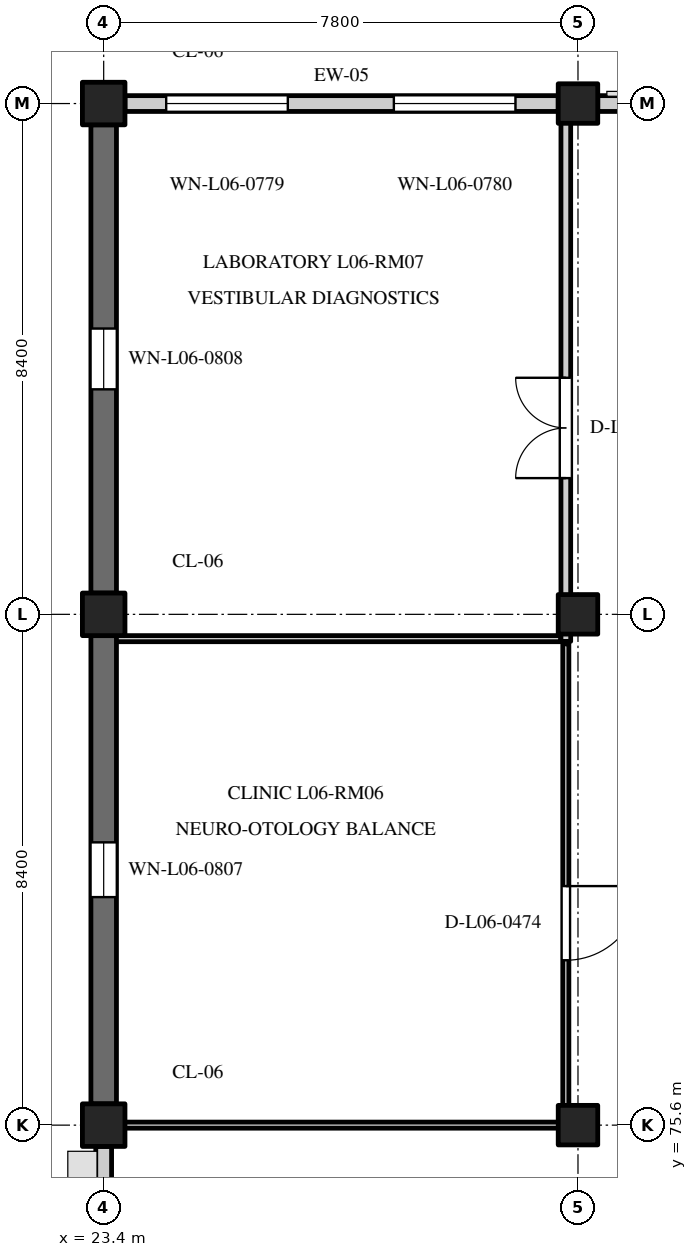
"""IFC4 building model, lengths in metres.
Left out: names, types, materials, properties, quantities, classifications, styles, units other than length and angle.
Written with IfcOpenShell. Run it as: python <this file> out.ifc"""

import sys

from ifc_helpers import new_model, si_unit, direction, frame, frame_2d, origin, origin_2d, place, context, subcontext, project, spatial, rectangle, extrude, element, fill, save


model = new_model("IFC4")
c1 = context("Model", 3, precision=1e-05, world=origin(), true_north=direction((0.0, 1.0)))
c2 = subcontext(c1, "Body", "Model", "MODEL_VIEW")
j1 = project(units=[si_unit("LENGTHUNIT", "METRE"), si_unit("PLANEANGLEUNIT", "RADIAN")], contexts=[c1])
p1 = place(None, origin())
s1 = spatial("IfcSite", under=j1, at=p1, CompositionType="ELEMENT")
p2 = place(p1, origin())
s2 = spatial("IfcBuilding", under=s1, at=p2, CompositionType="ELEMENT")
p3 = place(p2, frame((0.0, 0.0, 26.1)))
s3 = spatial("IfcBuildingStorey", under=s2, at=p3, CompositionType="ELEMENT", Elevation=26.1)
for number, where, z_axis, x_axis in (
    (1, (23.4, 75.6, 0.0), (0.0, 0.0, 1.0), (1.0, 0.0, 0.0)),
    (2, (23.4, 84.0, 0.0), (0.0, 0.0, 1.0), (1.0, 0.0, 0.0)),
    (3, (23.4, 92.4, 0.0), (0.0, 0.0, 1.0), (1.0, 0.0, 0.0)),
):
    element("IfcColumn", number, at=place(p3, frame(where, z_axis=z_axis, x_axis=x_axis)), inside=s3, PredefinedType="COLUMN", context=c2, shape_type="SweptSolid", body=[
        extrude(rectangle(XDim=0.7, YDim=0.7, at=origin_2d()), origin(), (0.0, 0.0, 1.0), 3.6),
    ])
for number, where, z_axis, x_axis in (
    (4, (31.2, 75.6, 0.0), (0.0, 0.0, 1.0), (1.0, 0.0, 0.0)),
    (5, (31.2, 84.0, 0.0), (0.0, 0.0, 1.0), (1.0, 0.0, 0.0)),
    (6, (31.2, 92.4, 0.0), (0.0, 0.0, 1.0), (1.0, 0.0, 0.0)),
):
    element("IfcColumn", number, at=place(p3, frame(where, z_axis=z_axis, x_axis=x_axis)), inside=s3, PredefinedType="COLUMN", context=c2, shape_type="SweptSolid", body=[
        extrude(rectangle(XDim=0.65, YDim=0.65, at=origin_2d()), origin(), (0.0, 0.0, 1.0), 3.6),
    ])
p4 = place(p3, frame((23.75, 92.4, 0.0), z_axis=(0.0, 0.0, 1.0), x_axis=(1.0, 0.0, 0.0)))
e7 = element("IfcWall", 7, at=p4, inside=s3, PredefinedType="STANDARD", context=c2, shape_type="SweptSolid", body=[
    extrude(rectangle(XDim=7.125, YDim=0.26, at=frame_2d((3.562, 0.0))), origin(), (0.0, 0.0, 1.0), 2.75),
])
p5 = place(p4, frame((0.678, 0.0, 0.8)))
e8 = element("IfcOpeningElement", 8, at=p5, cuts=e7, PredefinedType="OPENING", context=c2, shape_type="SweptSolid", body=[
    extrude(rectangle(XDim=2.0, YDim=1.65, at=frame_2d((1.0, 0.825))), frame((0.0, 0.142, 0.0), z_axis=(0.0, -1.0, 0.0), x_axis=(1.0, 0.0, 0.0)), (0.0, 0.0, 1.0), 0.284),
])
p6 = place(p4, frame((4.422, 0.0, 0.8)))
e9 = element("IfcOpeningElement", 9, at=p6, cuts=e7, PredefinedType="OPENING", context=c2, shape_type="SweptSolid", body=[
    extrude(rectangle(XDim=2.0, YDim=1.65, at=frame_2d((1.0, 0.825))), frame((0.0, 0.142, 0.0), z_axis=(0.0, -1.0, 0.0), x_axis=(1.0, 0.0, 0.0)), (0.0, 0.0, 1.0), 0.284),
])
p7 = place(p3, frame((31.525, 92.4, 0.0), z_axis=(0.0, 0.0, 1.0), x_axis=(1.0, 0.0, 0.0)))
e10 = element("IfcWall", 10, at=p7, inside=s3, PredefinedType="STANDARD", context=c2, shape_type="SweptSolid", body=[
    extrude(rectangle(XDim=7.15, YDim=0.26, at=frame_2d((3.575, 0.0))), origin(), (0.0, 0.0, 1.0), 2.75),
])
p8 = place(p3, frame((23.4, 67.55, 0.0), z_axis=(0.0, 0.0, 1.0), x_axis=(0.0, 1.0, 0.0)))
e11 = element("IfcWall", 11, at=p8, inside=s3, PredefinedType="STANDARD", context=c2, shape_type="SweptSolid", body=[
    extrude(rectangle(XDim=7.7, YDim=0.26, at=frame_2d((3.85, 0.0))), origin(), (0.0, 0.0, 1.0), 2.65),
])
p9 = place(p8, frame((0.784, 0.0, 0.8)))
e12 = element("IfcOpeningElement", 12, at=p9, cuts=e11, PredefinedType="OPENING", context=c2, shape_type="SweptSolid", body=[
    extrude(rectangle(XDim=2.1, YDim=1.55, at=frame_2d((1.05, 0.775))), frame((0.0, 0.142, 0.0), z_axis=(0.0, -1.0, 0.0), x_axis=(1.0, 0.0, 0.0)), (0.0, 0.0, 1.0), 0.284),
])
p10 = place(p8, frame((4.816, 0.0, 0.8)))
e13 = element("IfcOpeningElement", 13, at=p10, cuts=e11, PredefinedType="OPENING", context=c2, shape_type="SweptSolid", body=[
    extrude(rectangle(XDim=2.1, YDim=1.55, at=frame_2d((1.05, 0.775))), frame((0.0, 0.142, 0.0), z_axis=(0.0, -1.0, 0.0), x_axis=(1.0, 0.0, 0.0)), (0.0, 0.0, 1.0), 0.284),
])
p11 = place(p3, frame((23.4, 75.95, 0.0), z_axis=(0.0, 0.0, 1.0), x_axis=(0.0, 1.0, 0.0)))
e14 = element("IfcWall", 14, at=p11, inside=s3, PredefinedType="SOLIDWALL", context=c2, shape_type="SweptSolid", body=[
    extrude(rectangle(XDim=7.7, YDim=0.42, at=frame_2d((3.85, 0.0))), origin(), (0.0, 0.0, 1.0), 2.65),
])
p12 = place(p11, frame((3.4, 0.0, 0.8)))
e15 = element("IfcOpeningElement", 15, at=p12, cuts=e14, PredefinedType="OPENING", context=c2, shape_type="SweptSolid", body=[
    extrude(rectangle(XDim=0.9, YDim=1.3, at=frame_2d((0.45, 0.65))), frame((0.0, 0.222, 0.0), z_axis=(0.0, -1.0, 0.0), x_axis=(1.0, 0.0, 0.0)), (0.0, 0.0, 1.0), 0.444),
])
p13 = place(p3, frame((23.4, 84.35, 0.0), z_axis=(0.0, 0.0, 1.0), x_axis=(0.0, 1.0, 0.0)))
e16 = element("IfcWall", 16, at=p13, inside=s3, PredefinedType="SOLIDWALL", context=c2, shape_type="SweptSolid", body=[
    extrude(rectangle(XDim=7.7, YDim=0.42, at=frame_2d((3.85, 0.0))), origin(), (0.0, 0.0, 1.0), 2.65),
])
p14 = place(p13, frame((3.35, 0.0, 0.8)))
e17 = element("IfcOpeningElement", 17, at=p14, cuts=e16, PredefinedType="OPENING", context=c2, shape_type="SweptSolid", body=[
    extrude(rectangle(XDim=1.0, YDim=1.45, at=frame_2d((0.5, 0.725))), frame((0.0, 0.222, 0.0), z_axis=(0.0, -1.0, 0.0), x_axis=(1.0, 0.0, 0.0)), (0.0, 0.0, 1.0), 0.444),
])
p15 = place(p3, frame((31.0, 75.685, 0.0), z_axis=(0.0, 0.0, 1.0), x_axis=(0.0, 1.0, 0.0)))
e18 = element("IfcWall", 18, at=p15, inside=s3, PredefinedType="PARTITIONING", context=c2, shape_type="SweptSolid", body=[
    extrude(rectangle(XDim=7.83, YDim=0.1, at=frame_2d((3.915, 0.0))), origin(), (0.0, 0.0, 1.0), 3.28),
])
p16 = place(p15, frame((2.626, 0.0, 0.0)))
e19 = element("IfcOpeningElement", 19, at=p16, cuts=e18, PredefinedType="OPENING", context=c2, shape_type="SweptSolid", body=[
    extrude(rectangle(XDim=1.22, YDim=2.15, at=frame_2d((0.61, 1.075))), frame((0.0, 0.062, 0.0), z_axis=(0.0, -1.0, 0.0), x_axis=(1.0, 0.0, 0.0)), (0.0, 0.0, 1.0), 0.124),
])
p17 = place(p3, frame((23.485, 75.6, 0.0), z_axis=(0.0, 0.0, 1.0), x_axis=(1.0, 0.0, 0.0)))
e20 = element("IfcWall", 20, at=p17, inside=s3, PredefinedType="PARTITIONING", context=c2, shape_type="SweptSolid", body=[
    extrude(rectangle(XDim=7.43, YDim=0.1, at=frame_2d((3.715, 0.0))), origin(), (0.0, 0.0, 1.0), 2.65),
])
p18 = place(p3, frame((23.485, 83.6, 0.0), z_axis=(0.0, 0.0, 1.0), x_axis=(1.0, 0.0, 0.0)))
e21 = element("IfcWall", 21, at=p18, inside=s3, PredefinedType="PARTITIONING", context=c2, shape_type="SweptSolid", body=[
    extrude(rectangle(XDim=7.43, YDim=0.1, at=frame_2d((3.715, 0.0))), origin(), (0.0, 0.0, 1.0), 3.28),
])
p19 = place(p3, frame((23.4, 83.69, 0.0), z_axis=(0.0, 0.0, 1.0), x_axis=(0.0, 1.0, 0.0)))
e22 = element("IfcWall", 22, at=p19, inside=s3, PredefinedType="PARTITIONING", context=c2, shape_type="SweptSolid", body=[
    extrude(rectangle(XDim=0.62, YDim=0.16, at=frame_2d((0.31, 0.0))), origin(), (0.0, 0.0, 1.0), 2.65),
])
p20 = place(p3, frame((31.0, 83.555, 0.0), z_axis=(0.0, 0.0, 1.0), x_axis=(0.0, 1.0, 0.0)))
e23 = element("IfcWall", 23, at=p20, inside=s3, PredefinedType="PARTITIONING", context=c2, shape_type="SweptSolid", body=[
    extrude(rectangle(XDim=8.76, YDim=0.16, at=frame_2d((4.38, 0.0))), origin(), (0.0, 0.0, 1.0), 3.28),
])
p21 = place(p20, frame((2.685, 0.0, 0.0)))
e24 = element("IfcOpeningElement", 24, at=p21, cuts=e23, PredefinedType="OPENING", context=c2, shape_type="SweptSolid", body=[
    extrude(rectangle(XDim=1.65, YDim=2.25, at=frame_2d((0.825, 1.125))), frame((0.0, 0.092, 0.0), z_axis=(0.0, -1.0, 0.0), x_axis=(1.0, 0.0, 0.0)), (0.0, 0.0, 1.0), 0.184),
])
p22 = place(p5, origin())
e25 = element("IfcWindow", 25, at=p22, inside=s3, PartitioningType="DOUBLE_PANEL_VERTICAL", PredefinedType="WINDOW", context=c2, shape_type="SweptSolid", body=[
    extrude(rectangle(XDim=2.0, YDim=1.65, at=frame_2d((1.0, 0.825))), frame((0.0, 0.03, 0.0), z_axis=(0.0, -1.0, 0.0), x_axis=(1.0, 0.0, 0.0)), (0.0, 0.0, 1.0), 0.06),
])
fill(e8, e25)
p23 = place(p6, origin())
e26 = element("IfcWindow", 26, at=p23, inside=s3, PartitioningType="DOUBLE_PANEL_VERTICAL", PredefinedType="WINDOW", context=c2, shape_type="SweptSolid", body=[
    extrude(rectangle(XDim=2.0, YDim=1.65, at=frame_2d((1.0, 0.825))), frame((0.0, 0.03, 0.0), z_axis=(0.0, -1.0, 0.0), x_axis=(1.0, 0.0, 0.0)), (0.0, 0.0, 1.0), 0.06),
])
fill(e9, e26)
p24 = place(p12, origin())
e27 = element("IfcWindow", 27, at=p24, inside=s3, PartitioningType="SINGLE_PANEL", PredefinedType="WINDOW", context=c2, shape_type="SweptSolid", body=[
    extrude(rectangle(XDim=0.9, YDim=1.3, at=frame_2d((0.45, 0.65))), frame((0.0, 0.03, 0.0), z_axis=(0.0, -1.0, 0.0), x_axis=(1.0, 0.0, 0.0)), (0.0, 0.0, 1.0), 0.06),
])
fill(e15, e27)
p25 = place(p14, origin())
e28 = element("IfcWindow", 28, at=p25, inside=s3, PartitioningType="SINGLE_PANEL", PredefinedType="WINDOW", context=c2, shape_type="SweptSolid", body=[
    extrude(rectangle(XDim=1.0, YDim=1.45, at=frame_2d((0.5, 0.725))), frame((0.0, 0.03, 0.0), z_axis=(0.0, -1.0, 0.0), x_axis=(1.0, 0.0, 0.0)), (0.0, 0.0, 1.0), 0.06),
])
fill(e17, e28)
p26 = place(p16, origin())
e29 = element("IfcDoor", 29, at=p26, inside=s3, OperationType="SINGLE_SWING_RIGHT", PredefinedType="DOOR", context=c2, shape_type="SweptSolid", body=[
    extrude(rectangle(XDim=1.22, YDim=2.15, at=frame_2d((0.61, 1.075))), frame((0.0, 0.025, 0.0), z_axis=(0.0, -1.0, 0.0), x_axis=(1.0, 0.0, 0.0)), (0.0, 0.0, 1.0), 0.05),
])
fill(e19, e29)
p27 = place(p21, origin())
e30 = element("IfcDoor", 30, at=p27, inside=s3, OperationType="DOUBLE_DOOR_SINGLE_SWING", PredefinedType="DOOR", context=c2, shape_type="SweptSolid", body=[
    extrude(rectangle(XDim=1.65, YDim=2.25, at=frame_2d((0.825, 1.125))), frame((0.0, 0.025, 0.0), z_axis=(0.0, -1.0, 0.0), x_axis=(1.0, 0.0, 0.0)), (0.0, 0.0, 1.0), 0.05),
])
fill(e24, e30)
save(model, sys.argv[1])
